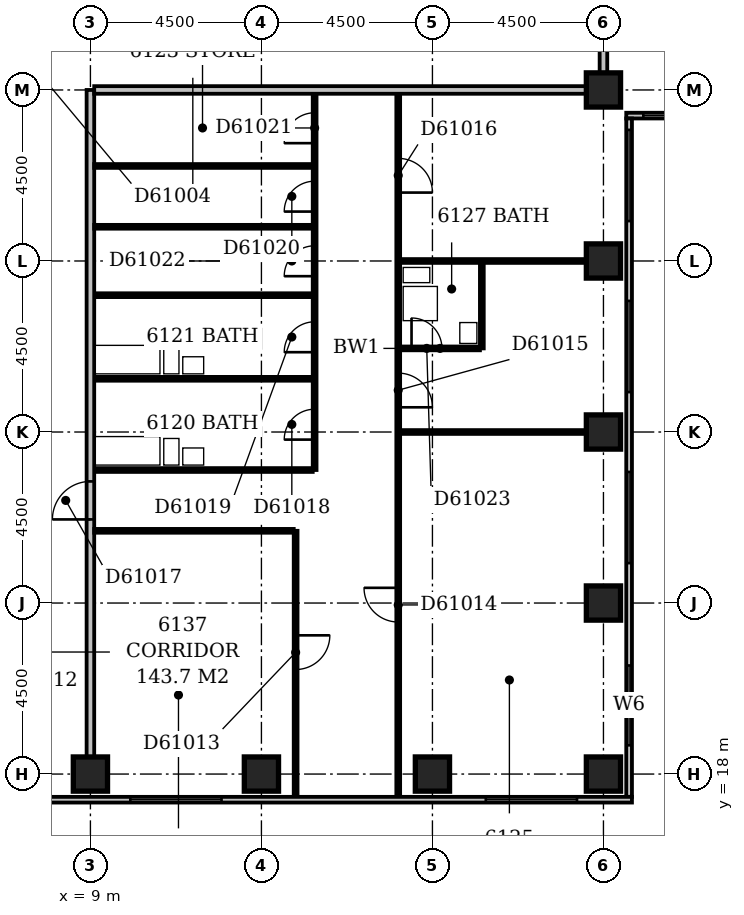
"""IFC4 building model, lengths in metres.
Left out: names, types, materials, properties, quantities, classifications, styles, units other than length and angle.
Written with IfcOpenShell. Run it as: python <this file> out.ifc"""

import sys

from ifc_helpers import new_model, si_unit, direction, frame, frame_2d, origin, origin_2d, place, context, subcontext, project, spatial, rectangle, extrude, element, fill, save


model = new_model("IFC4")
c1 = context("Model", 3, precision=1e-05, world=origin(), true_north=direction((0.0, 1.0)))
c2 = subcontext(c1, "Body", "Model", "MODEL_VIEW")
j1 = project(units=[si_unit("LENGTHUNIT", "METRE"), si_unit("PLANEANGLEUNIT", "RADIAN")], contexts=[c1])
p1 = place(None, origin())
s1 = spatial("IfcSite", under=j1, at=p1, CompositionType="ELEMENT")
p2 = place(p1, origin())
s2 = spatial("IfcBuilding", under=s1, at=p2, CompositionType="ELEMENT")
p3 = place(p2, frame((0.0, 0.0, 236.6)))
s3 = spatial("IfcBuildingStorey", under=s2, at=p3, CompositionType="ELEMENT", Elevation=236.6)
for number, where, z_axis, x_axis in (
    (1, (9.0, 18.0, -0.3), (0.0, 0.0, 1.0), (1.0, 0.0, 0.0)),
    (2, (13.5, 18.0, -0.3), (0.0, 0.0, 1.0), (1.0, 0.0, 0.0)),
    (3, (18.0, 18.0, -0.3), (0.0, 0.0, 1.0), (1.0, 0.0, 0.0)),
    (4, (22.5, 18.0, -0.3), (0.0, 0.0, 1.0), (1.0, 0.0, 0.0)),
    (5, (22.5, 22.5, -0.3), (0.0, 0.0, 1.0), (1.0, 0.0, 0.0)),
    (6, (22.5, 27.0, -0.3), (0.0, 0.0, 1.0), (1.0, 0.0, 0.0)),
    (7, (22.5, 31.5, -0.3), (0.0, 0.0, 1.0), (1.0, 0.0, 0.0)),
    (8, (22.5, 36.0, -0.3), (0.0, 0.0, 1.0), (1.0, 0.0, 0.0)),
):
    element("IfcColumn", number, at=place(p3, frame(where, z_axis=z_axis, x_axis=x_axis)), inside=s3, PredefinedType="COLUMN", context=c2, shape_type="SweptSolid", body=[
        extrude(rectangle(XDim=0.9, YDim=0.9, at=origin_2d()), origin(), (0.0, 0.0, 1.0), 3.6),
    ])
p4 = place(p3, frame((3.9, 17.325, 0.0), z_axis=(0.0, 0.0, 1.0), x_axis=(1.0, 0.0, 0.0)))
e9 = element("IfcWall", 9, at=p4, inside=s3, PredefinedType="STANDARD", context=c2, shape_type="SweptSolid", body=[
    extrude(rectangle(XDim=19.35, YDim=0.15, at=frame_2d((9.675, 0.0))), origin(), (0.0, 0.0, 1.0), 2.7),
])
p5 = place(p4, frame((6.15, 0.0, 0.6)))
e10 = element("IfcOpeningElement", 10, at=p5, cuts=e9, PredefinedType="OPENING", context=c2, shape_type="SweptSolid", body=[
    extrude(rectangle(XDim=2.4, YDim=1.8, at=frame_2d((1.2, 0.9))), frame((0.0, 0.087, 0.0), z_axis=(0.0, -1.0, 0.0), x_axis=(1.0, 0.0, 0.0)), (0.0, 0.0, 1.0), 0.174),
])
p6 = place(p4, frame((15.504, 0.0, 0.6)))
e11 = element("IfcOpeningElement", 11, at=p6, cuts=e9, PredefinedType="OPENING", context=c2, shape_type="SweptSolid", body=[
    extrude(rectangle(XDim=2.4, YDim=1.8, at=frame_2d((1.2, 0.9))), frame((0.0, 0.087, 0.0), z_axis=(0.0, -1.0, 0.0), x_axis=(1.0, 0.0, 0.0)), (0.0, 0.0, 1.0), 0.174),
])
p7 = place(p3, frame((23.175, 17.4, 0.0), z_axis=(0.0, 0.0, 1.0), x_axis=(0.0, 1.0, 0.0)))
e12 = element("IfcWall", 12, at=p7, inside=s3, PredefinedType="STANDARD", context=c2, shape_type="SweptSolid", body=[
    extrude(rectangle(XDim=17.85, YDim=0.15, at=frame_2d((8.925, 0.0))), origin(), (0.0, 0.0, 1.0), 2.7),
])
p8 = place(p7, frame((1.357, 0.0, 0.6)))
e13 = element("IfcOpeningElement", 13, at=p8, cuts=e12, PredefinedType="OPENING", context=c2, shape_type="SweptSolid", body=[
    extrude(rectangle(XDim=2.1, YDim=1.8, at=frame_2d((1.05, 0.9))), frame((0.0, 0.087, 0.0), z_axis=(0.0, -1.0, 0.0), x_axis=(1.0, 0.0, 0.0)), (0.0, 0.0, 1.0), 0.174),
])
p9 = place(p7, frame((6.15, 0.0, 0.6)))
e14 = element("IfcOpeningElement", 14, at=p9, cuts=e12, PredefinedType="OPENING", context=c2, shape_type="SweptSolid", body=[
    extrude(rectangle(XDim=2.4, YDim=1.8, at=frame_2d((1.2, 0.9))), frame((0.0, 0.087, 0.0), z_axis=(0.0, -1.0, 0.0), x_axis=(1.0, 0.0, 0.0)), (0.0, 0.0, 1.0), 0.174),
])
p10 = place(p7, frame((10.65, 0.0, 0.6)))
e15 = element("IfcOpeningElement", 15, at=p10, cuts=e12, PredefinedType="OPENING", context=c2, shape_type="SweptSolid", body=[
    extrude(rectangle(XDim=2.4, YDim=1.8, at=frame_2d((1.2, 0.9))), frame((0.0, 0.087, 0.0), z_axis=(0.0, -1.0, 0.0), x_axis=(1.0, 0.0, 0.0)), (0.0, 0.0, 1.0), 0.174),
])
p11 = place(p7, frame((15.15, 0.0, 0.6)))
e16 = element("IfcOpeningElement", 16, at=p11, cuts=e12, PredefinedType="OPENING", context=c2, shape_type="SweptSolid", body=[
    extrude(rectangle(XDim=2.4, YDim=1.8, at=frame_2d((1.2, 0.9))), frame((0.0, 0.087, 0.0), z_axis=(0.0, -1.0, 0.0), x_axis=(1.0, 0.0, 0.0)), (0.0, 0.0, 1.0), 0.174),
])
p12 = place(p3, frame((23.1, 35.325, 0.0), z_axis=(0.0, 0.0, 1.0), x_axis=(1.0, 0.0, 0.0)))
e17 = element("IfcWall", 17, at=p12, inside=s3, PredefinedType="STANDARD", context=c2, shape_type="SweptSolid", body=[
    extrude(rectangle(XDim=18.15, YDim=0.15, at=frame_2d((9.075, 0.0))), origin(), (0.0, 0.0, 1.0), 2.7),
])
p13 = place(p12, frame((0.45, 0.0, 0.6)))
e18 = element("IfcOpeningElement", 18, at=p13, cuts=e17, PredefinedType="OPENING", context=c2, shape_type="SweptSolid", body=[
    extrude(rectangle(XDim=2.4, YDim=1.8, at=frame_2d((1.2, 0.9))), frame((0.0, 0.087, 0.0), z_axis=(0.0, -1.0, 0.0), x_axis=(1.0, 0.0, 0.0)), (0.0, 0.0, 1.0), 0.174),
])
p14 = place(p12, frame((5.242, 0.0, 0.6)))
e19 = element("IfcOpeningElement", 19, at=p14, cuts=e17, PredefinedType="OPENING", context=c2, shape_type="SweptSolid", body=[
    extrude(rectangle(XDim=2.4, YDim=1.8, at=frame_2d((1.2, 0.9))), frame((0.0, 0.087, 0.0), z_axis=(0.0, -1.0, 0.0), x_axis=(1.0, 0.0, 0.0)), (0.0, 0.0, 1.0), 0.174),
])
p15 = place(p12, frame((9.45, 0.0, 0.6)))
e20 = element("IfcOpeningElement", 20, at=p15, cuts=e17, PredefinedType="OPENING", context=c2, shape_type="SweptSolid", body=[
    extrude(rectangle(XDim=2.4, YDim=1.8, at=frame_2d((1.2, 0.9))), frame((0.0, 0.087, 0.0), z_axis=(0.0, -1.0, 0.0), x_axis=(1.0, 0.0, 0.0)), (0.0, 0.0, 1.0), 0.174),
])
p16 = place(p12, frame((13.95, 0.0, 0.6)))
e21 = element("IfcOpeningElement", 21, at=p16, cuts=e17, PredefinedType="OPENING", context=c2, shape_type="SweptSolid", body=[
    extrude(rectangle(XDim=2.4, YDim=1.8, at=frame_2d((1.2, 0.9))), frame((0.0, 0.087, 0.0), z_axis=(0.0, -1.0, 0.0), x_axis=(1.0, 0.0, 0.0)), (0.0, 0.0, 1.0), 0.174),
])
p17 = place(p3, frame((14.4, 17.4, 0.0), z_axis=(0.0, 0.0, 1.0), x_axis=(0.0, 1.0, 0.0)))
e22 = element("IfcWall", 22, at=p17, inside=s3, PredefinedType="PARTITIONING", context=c2, shape_type="SweptSolid", body=[
    extrude(rectangle(XDim=7.0, YDim=0.1, at=frame_2d((3.5, 0.0))), origin(), (0.0, 0.0, 1.0), 3.3),
])
p18 = place(p17, frame((3.35, 0.0, 0.0)))
e23 = element("IfcOpeningElement", 23, at=p18, cuts=e22, PredefinedType="OPENING", context=c2, shape_type="SweptSolid", body=[
    extrude(rectangle(XDim=0.9, YDim=2.1, at=frame_2d((0.45, 1.05))), frame((0.0, 0.062, 0.0), z_axis=(0.0, -1.0, 0.0), x_axis=(1.0, 0.0, 0.0)), (0.0, 0.0, 1.0), 0.124),
])
p19 = place(p3, frame((17.1, 17.4, 0.0), z_axis=(0.0, 0.0, 1.0), x_axis=(0.0, 1.0, 0.0)))
e24 = element("IfcWall", 24, at=p19, inside=s3, PredefinedType="PARTITIONING", context=c2, shape_type="SweptSolid", body=[
    extrude(rectangle(XDim=18.5, YDim=0.1, at=frame_2d((9.25, 0.0))), origin(), (0.0, 0.0, 1.0), 3.3),
])
p20 = place(p19, frame((4.6, 0.0, 0.0)))
e25 = element("IfcOpeningElement", 25, at=p20, cuts=e24, PredefinedType="OPENING", context=c2, shape_type="SweptSolid", body=[
    extrude(rectangle(XDim=0.9, YDim=2.1, at=frame_2d((0.45, 1.05))), frame((0.0, 0.062, 0.0), z_axis=(0.0, -1.0, 0.0), x_axis=(1.0, 0.0, 0.0)), (0.0, 0.0, 1.0), 0.124),
])
p21 = place(p19, frame((10.25, 0.0, 0.0)))
e26 = element("IfcOpeningElement", 26, at=p21, cuts=e24, PredefinedType="OPENING", context=c2, shape_type="SweptSolid", body=[
    extrude(rectangle(XDim=0.9, YDim=2.1, at=frame_2d((0.45, 1.05))), frame((0.0, 0.062, 0.0), z_axis=(0.0, -1.0, 0.0), x_axis=(1.0, 0.0, 0.0)), (0.0, 0.0, 1.0), 0.124),
])
p22 = place(p19, frame((15.9, 0.0, 0.0)))
e27 = element("IfcOpeningElement", 27, at=p22, cuts=e24, PredefinedType="OPENING", context=c2, shape_type="SweptSolid", body=[
    extrude(rectangle(XDim=0.9, YDim=2.1, at=frame_2d((0.45, 1.05))), frame((0.0, 0.062, 0.0), z_axis=(0.0, -1.0, 0.0), x_axis=(1.0, 0.0, 0.0)), (0.0, 0.0, 1.0), 0.124),
])
p23 = place(p3, frame((9.0, 18.45, 0.0), z_axis=(0.0, 0.0, 1.0), x_axis=(0.0, 1.0, 0.0)))
e28 = element("IfcWall", 28, at=p23, inside=s3, PredefinedType="PARTITIONING", context=c2, shape_type="SweptSolid", body=[
    extrude(rectangle(XDim=17.55, YDim=0.2, at=frame_2d((8.775, 0.0))), origin(), (0.0, 0.0, 1.0), 3.3),
])
p24 = place(p23, frame((6.25, 0.0, 0.0)))
e29 = element("IfcOpeningElement", 29, at=p24, cuts=e28, PredefinedType="OPENING", context=c2, shape_type="SweptSolid", body=[
    extrude(rectangle(XDim=1.0, YDim=2.1, at=frame_2d((0.5, 1.05))), frame((0.0, 0.112, 0.0), z_axis=(0.0, -1.0, 0.0), x_axis=(1.0, 0.0, 0.0)), (0.0, 0.0, 1.0), 0.224),
])
p25 = place(p3, frame((9.1, 24.4, 0.0), z_axis=(0.0, 0.0, 1.0), x_axis=(1.0, 0.0, 0.0)))
e30 = element("IfcWall", 30, at=p25, inside=s3, PredefinedType="PARTITIONING", context=c2, shape_type="SweptSolid", body=[
    extrude(rectangle(XDim=5.25, YDim=0.1, at=frame_2d((2.625, 0.0))), origin(), (0.0, 0.0, 1.0), 3.3),
])
p26 = place(p3, frame((9.1, 26.0, 0.0), z_axis=(0.0, 0.0, 1.0), x_axis=(1.0, 0.0, 0.0)))
e31 = element("IfcWall", 31, at=p26, inside=s3, PredefinedType="PLUMBINGWALL", context=c2, shape_type="SweptSolid", body=[
    extrude(rectangle(XDim=5.75, YDim=0.1, at=frame_2d((2.875, 0.0))), origin(), (0.0, 0.0, 1.0), 3.3),
])
p27 = place(p3, frame((14.9, 26.0, 0.0), z_axis=(0.0, 0.0, 1.0), x_axis=(0.0, 1.0, 0.0)))
e32 = element("IfcWall", 32, at=p27, inside=s3, PredefinedType="PARTITIONING", context=c2, shape_type="SweptSolid", body=[
    extrude(rectangle(XDim=9.9, YDim=0.1, at=frame_2d((4.95, 0.0))), origin(), (0.0, 0.0, 1.0), 3.3),
])
p28 = place(p27, frame((0.8, 0.0, 0.0)))
e33 = element("IfcOpeningElement", 33, at=p28, cuts=e32, PredefinedType="OPENING", context=c2, shape_type="SweptSolid", body=[
    extrude(rectangle(XDim=0.8, YDim=2.1, at=frame_2d((0.4, 1.05))), frame((0.0, 0.062, 0.0), z_axis=(0.0, -1.0, 0.0), x_axis=(1.0, 0.0, 0.0)), (0.0, 0.0, 1.0), 0.124),
])
p29 = place(p27, frame((3.1, 0.0, 0.0)))
e34 = element("IfcOpeningElement", 34, at=p29, cuts=e32, PredefinedType="OPENING", context=c2, shape_type="SweptSolid", body=[
    extrude(rectangle(XDim=0.8, YDim=2.1, at=frame_2d((0.4, 1.05))), frame((0.0, 0.062, 0.0), z_axis=(0.0, -1.0, 0.0), x_axis=(1.0, 0.0, 0.0)), (0.0, 0.0, 1.0), 0.124),
])
p30 = place(p27, frame((6.8, 0.0, 0.0)))
e35 = element("IfcOpeningElement", 35, at=p30, cuts=e32, PredefinedType="OPENING", context=c2, shape_type="SweptSolid", body=[
    extrude(rectangle(XDim=0.8, YDim=2.1, at=frame_2d((0.4, 1.05))), frame((0.0, 0.062, 0.0), z_axis=(0.0, -1.0, 0.0), x_axis=(1.0, 0.0, 0.0)), (0.0, 0.0, 1.0), 0.124),
])
p31 = place(p27, frame((8.6, 0.0, 0.0)))
e36 = element("IfcOpeningElement", 36, at=p31, cuts=e32, PredefinedType="OPENING", context=c2, shape_type="SweptSolid", body=[
    extrude(rectangle(XDim=0.8, YDim=2.1, at=frame_2d((0.4, 1.05))), frame((0.0, 0.062, 0.0), z_axis=(0.0, -1.0, 0.0), x_axis=(1.0, 0.0, 0.0)), (0.0, 0.0, 1.0), 0.124),
])
p32 = place(p27, frame((5.1, 0.0, 0.0)))
e37 = element("IfcOpeningElement", 37, at=p32, cuts=e32, PredefinedType="OPENING", context=c2, shape_type="SweptSolid", body=[
    extrude(rectangle(XDim=0.8, YDim=2.1, at=frame_2d((0.4, 1.05))), frame((0.0, 0.062, 0.0), z_axis=(0.0, -1.0, 0.0), x_axis=(1.0, 0.0, 0.0)), (0.0, 0.0, 1.0), 0.124),
])
p33 = place(p3, frame((17.15, 27.0, 0.0), z_axis=(0.0, 0.0, 1.0), x_axis=(1.0, 0.0, 0.0)))
e38 = element("IfcWall", 38, at=p33, inside=s3, PredefinedType="PARTITIONING", context=c2, shape_type="SweptSolid", body=[
    extrude(rectangle(XDim=4.9, YDim=0.1, at=frame_2d((2.45, 0.0))), origin(), (0.0, 0.0, 1.0), 2.7),
])
p34 = place(p3, frame((9.1, 28.4, 0.0), z_axis=(0.0, 0.0, 1.0), x_axis=(1.0, 0.0, 0.0)))
e39 = element("IfcWall", 39, at=p34, inside=s3, PredefinedType="PLUMBINGWALL", context=c2, shape_type="SweptSolid", body=[
    extrude(rectangle(XDim=5.75, YDim=0.1, at=frame_2d((2.875, 0.0))), origin(), (0.0, 0.0, 1.0), 3.3),
])
p35 = place(p3, frame((17.15, 29.2, 0.0), z_axis=(0.0, 0.0, 1.0), x_axis=(1.0, 0.0, 0.0)))
e40 = element("IfcWall", 40, at=p35, inside=s3, PredefinedType="PLUMBINGWALL", context=c2, shape_type="SweptSolid", body=[
    extrude(rectangle(XDim=2.1, YDim=0.1, at=frame_2d((1.05, 0.0))), origin(), (0.0, 0.0, 1.0), 3.3),
])
p36 = place(p35, frame((0.3, 0.0, 0.0)))
e41 = element("IfcOpeningElement", 41, at=p36, cuts=e40, PredefinedType="OPENING", context=c2, shape_type="SweptSolid", body=[
    extrude(rectangle(XDim=0.8, YDim=2.1, at=frame_2d((0.4, 1.05))), frame((0.0, 0.062, 0.0), z_axis=(0.0, -1.0, 0.0), x_axis=(1.0, 0.0, 0.0)), (0.0, 0.0, 1.0), 0.124),
])
p37 = place(p3, frame((19.3, 29.2, 0.0), z_axis=(0.0, 0.0, 1.0), x_axis=(0.0, 1.0, 0.0)))
e42 = element("IfcWall", 42, at=p37, inside=s3, PredefinedType="PLUMBINGWALL", context=c2, shape_type="SweptSolid", body=[
    extrude(rectangle(XDim=2.25, YDim=0.1, at=frame_2d((1.125, 0.0))), origin(), (0.0, 0.0, 1.0), 3.3),
])
p38 = place(p3, frame((9.1, 30.6, 0.0), z_axis=(0.0, 0.0, 1.0), x_axis=(1.0, 0.0, 0.0)))
e43 = element("IfcWall", 43, at=p38, inside=s3, PredefinedType="PLUMBINGWALL", context=c2, shape_type="SweptSolid", body=[
    extrude(rectangle(XDim=5.75, YDim=0.1, at=frame_2d((2.875, 0.0))), origin(), (0.0, 0.0, 1.0), 3.3),
])
p39 = place(p3, frame((17.15, 31.5, 0.0), z_axis=(0.0, 0.0, 1.0), x_axis=(1.0, 0.0, 0.0)))
e44 = element("IfcWall", 44, at=p39, inside=s3, PredefinedType="PARTITIONING", context=c2, shape_type="SweptSolid", body=[
    extrude(rectangle(XDim=4.9, YDim=0.1, at=frame_2d((2.45, 0.0))), origin(), (0.0, 0.0, 1.0), 3.3),
])
for number, where, z_axis, x_axis in (
    (45, (9.1, 32.4, 0.0), (0.0, 0.0, 1.0), (1.0, 0.0, 0.0)),
    (46, (9.1, 34.0, 0.0), (0.0, 0.0, 1.0), (1.0, 0.0, 0.0)),
):
    element("IfcWall", number, at=place(p3, frame(where, z_axis=z_axis, x_axis=x_axis)), inside=s3, PredefinedType="PARTITIONING", context=c2, shape_type="SweptSolid", body=[
        extrude(rectangle(XDim=5.75, YDim=0.1, at=frame_2d((2.875, 0.0))), origin(), (0.0, 0.0, 1.0), 3.3),
    ])
p40 = place(p3, frame((9.1, 36.0, 0.0), z_axis=(0.0, 0.0, 1.0), x_axis=(1.0, 0.0, 0.0)))
e47 = element("IfcWall", 47, at=p40, inside=s3, PredefinedType="PARTITIONING", context=c2, shape_type="SweptSolid", body=[
    extrude(rectangle(XDim=12.95, YDim=0.2, at=frame_2d((6.475, 0.0))), origin(), (0.0, 0.0, 1.0), 3.3),
])
p41 = place(p3, frame((22.5, 36.45, 0.0), z_axis=(0.0, 0.0, 1.0), x_axis=(0.0, 1.0, 0.0)))
e48 = element("IfcWall", 48, at=p41, inside=s3, PredefinedType="PARTITIONING", context=c2, shape_type="SweptSolid", body=[
    extrude(rectangle(XDim=13.05, YDim=0.2, at=frame_2d((6.525, 0.0))), origin(), (0.0, 0.0, 1.0), 3.3),
])
p42 = place(p5, origin())
e49 = element("IfcWindow", 49, at=p42, inside=s3, PartitioningType="SINGLE_PANEL", PredefinedType="WINDOW", context=c2, shape_type="SweptSolid", body=[
    extrude(rectangle(XDim=2.4, YDim=1.8, at=frame_2d((1.2, 0.9))), frame((0.0, 0.03, 0.0), z_axis=(0.0, -1.0, 0.0), x_axis=(1.0, 0.0, 0.0)), (0.0, 0.0, 1.0), 0.06),
])
fill(e10, e49)
p43 = place(p6, origin())
e50 = element("IfcWindow", 50, at=p43, inside=s3, PartitioningType="SINGLE_PANEL", PredefinedType="WINDOW", context=c2, shape_type="SweptSolid", body=[
    extrude(rectangle(XDim=2.4, YDim=1.8, at=frame_2d((1.2, 0.9))), frame((0.0, 0.03, 0.0), z_axis=(0.0, -1.0, 0.0), x_axis=(1.0, 0.0, 0.0)), (0.0, 0.0, 1.0), 0.06),
])
fill(e11, e50)
p44 = place(p8, origin())
e51 = element("IfcWindow", 51, at=p44, inside=s3, PartitioningType="SINGLE_PANEL", PredefinedType="WINDOW", context=c2, shape_type="SweptSolid", body=[
    extrude(rectangle(XDim=2.1, YDim=1.8, at=frame_2d((1.05, 0.9))), frame((0.0, 0.03, 0.0), z_axis=(0.0, -1.0, 0.0), x_axis=(1.0, 0.0, 0.0)), (0.0, 0.0, 1.0), 0.06),
])
fill(e13, e51)
p45 = place(p9, origin())
e52 = element("IfcWindow", 52, at=p45, inside=s3, PartitioningType="SINGLE_PANEL", PredefinedType="WINDOW", context=c2, shape_type="SweptSolid", body=[
    extrude(rectangle(XDim=2.4, YDim=1.8, at=frame_2d((1.2, 0.9))), frame((0.0, 0.03, 0.0), z_axis=(0.0, -1.0, 0.0), x_axis=(1.0, 0.0, 0.0)), (0.0, 0.0, 1.0), 0.06),
])
fill(e14, e52)
p46 = place(p10, origin())
e53 = element("IfcWindow", 53, at=p46, inside=s3, PartitioningType="SINGLE_PANEL", PredefinedType="WINDOW", context=c2, shape_type="SweptSolid", body=[
    extrude(rectangle(XDim=2.4, YDim=1.8, at=frame_2d((1.2, 0.9))), frame((0.0, 0.03, 0.0), z_axis=(0.0, -1.0, 0.0), x_axis=(1.0, 0.0, 0.0)), (0.0, 0.0, 1.0), 0.06),
])
fill(e15, e53)
p47 = place(p11, origin())
e54 = element("IfcWindow", 54, at=p47, inside=s3, PartitioningType="SINGLE_PANEL", PredefinedType="WINDOW", context=c2, shape_type="SweptSolid", body=[
    extrude(rectangle(XDim=2.4, YDim=1.8, at=frame_2d((1.2, 0.9))), frame((0.0, 0.03, 0.0), z_axis=(0.0, -1.0, 0.0), x_axis=(1.0, 0.0, 0.0)), (0.0, 0.0, 1.0), 0.06),
])
fill(e16, e54)
p48 = place(p13, origin())
e55 = element("IfcWindow", 55, at=p48, inside=s3, PartitioningType="SINGLE_PANEL", PredefinedType="WINDOW", context=c2, shape_type="SweptSolid", body=[
    extrude(rectangle(XDim=2.4, YDim=1.8, at=frame_2d((1.2, 0.9))), frame((0.0, 0.03, 0.0), z_axis=(0.0, -1.0, 0.0), x_axis=(1.0, 0.0, 0.0)), (0.0, 0.0, 1.0), 0.06),
])
fill(e18, e55)
p49 = place(p18, origin())
e56 = element("IfcDoor", 56, at=p49, inside=s3, OperationType="SINGLE_SWING_RIGHT", PredefinedType="DOOR", context=c2, shape_type="SweptSolid", body=[
    extrude(rectangle(XDim=0.9, YDim=2.1, at=frame_2d((0.45, 1.05))), frame((0.0, 0.025, 0.0), z_axis=(0.0, -1.0, 0.0), x_axis=(1.0, 0.0, 0.0)), (0.0, 0.0, 1.0), 0.05),
])
fill(e23, e56)
p50 = place(p20, frame((0.9, 0.0, 0.0), z_axis=(0.0, 0.0, 1.0), x_axis=(-1.0, 0.0, 0.0)))
e57 = element("IfcDoor", 57, at=p50, inside=s3, OperationType="SINGLE_SWING_LEFT", PredefinedType="DOOR", context=c2, shape_type="SweptSolid", body=[
    extrude(rectangle(XDim=0.9, YDim=2.1, at=frame_2d((0.45, 1.05))), frame((0.0, 0.025, 0.0), z_axis=(0.0, -1.0, 0.0), x_axis=(1.0, 0.0, 0.0)), (0.0, 0.0, 1.0), 0.05),
])
fill(e25, e57)
p51 = place(p21, frame((0.9, 0.0, 0.0), z_axis=(0.0, 0.0, 1.0), x_axis=(-1.0, 0.0, 0.0)))
e58 = element("IfcDoor", 58, at=p51, inside=s3, OperationType="SINGLE_SWING_RIGHT", PredefinedType="DOOR", context=c2, shape_type="SweptSolid", body=[
    extrude(rectangle(XDim=0.9, YDim=2.1, at=frame_2d((0.45, 1.05))), frame((0.0, 0.025, 0.0), z_axis=(0.0, -1.0, 0.0), x_axis=(1.0, 0.0, 0.0)), (0.0, 0.0, 1.0), 0.05),
])
fill(e26, e58)
p52 = place(p22, frame((0.9, 0.0, 0.0), z_axis=(0.0, 0.0, 1.0), x_axis=(-1.0, 0.0, 0.0)))
e59 = element("IfcDoor", 59, at=p52, inside=s3, OperationType="SINGLE_SWING_RIGHT", PredefinedType="DOOR", context=c2, shape_type="SweptSolid", body=[
    extrude(rectangle(XDim=0.9, YDim=2.1, at=frame_2d((0.45, 1.05))), frame((0.0, 0.025, 0.0), z_axis=(0.0, -1.0, 0.0), x_axis=(1.0, 0.0, 0.0)), (0.0, 0.0, 1.0), 0.05),
])
fill(e27, e59)
p53 = place(p24, origin())
e60 = element("IfcDoor", 60, at=p53, inside=s3, OperationType="SINGLE_SWING_LEFT", PredefinedType="DOOR", context=c2, shape_type="SweptSolid", body=[
    extrude(rectangle(XDim=1.0, YDim=2.1, at=frame_2d((0.5, 1.05))), frame((0.0, 0.025, 0.0), z_axis=(0.0, -1.0, 0.0), x_axis=(1.0, 0.0, 0.0)), (0.0, 0.0, 1.0), 0.05),
])
fill(e29, e60)
p54 = place(p28, origin())
e61 = element("IfcDoor", 61, at=p54, inside=s3, OperationType="SINGLE_SWING_LEFT", PredefinedType="DOOR", context=c2, shape_type="SweptSolid", body=[
    extrude(rectangle(XDim=0.8, YDim=2.1, at=frame_2d((0.4, 1.05))), frame((0.0, 0.025, 0.0), z_axis=(0.0, -1.0, 0.0), x_axis=(1.0, 0.0, 0.0)), (0.0, 0.0, 1.0), 0.05),
])
fill(e33, e61)
p55 = place(p29, origin())
e62 = element("IfcDoor", 62, at=p55, inside=s3, OperationType="SINGLE_SWING_LEFT", PredefinedType="DOOR", context=c2, shape_type="SweptSolid", body=[
    extrude(rectangle(XDim=0.8, YDim=2.1, at=frame_2d((0.4, 1.05))), frame((0.0, 0.025, 0.0), z_axis=(0.0, -1.0, 0.0), x_axis=(1.0, 0.0, 0.0)), (0.0, 0.0, 1.0), 0.05),
])
fill(e34, e62)
p56 = place(p30, origin())
e63 = element("IfcDoor", 63, at=p56, inside=s3, OperationType="SINGLE_SWING_LEFT", PredefinedType="DOOR", context=c2, shape_type="SweptSolid", body=[
    extrude(rectangle(XDim=0.8, YDim=2.1, at=frame_2d((0.4, 1.05))), frame((0.0, 0.025, 0.0), z_axis=(0.0, -1.0, 0.0), x_axis=(1.0, 0.0, 0.0)), (0.0, 0.0, 1.0), 0.05),
])
fill(e35, e63)
p57 = place(p31, origin())
e64 = element("IfcDoor", 64, at=p57, inside=s3, OperationType="SINGLE_SWING_LEFT", PredefinedType="DOOR", context=c2, shape_type="SweptSolid", body=[
    extrude(rectangle(XDim=0.8, YDim=2.1, at=frame_2d((0.4, 1.05))), frame((0.0, 0.025, 0.0), z_axis=(0.0, -1.0, 0.0), x_axis=(1.0, 0.0, 0.0)), (0.0, 0.0, 1.0), 0.05),
])
fill(e36, e64)
p58 = place(p32, origin())
e65 = element("IfcDoor", 65, at=p58, inside=s3, OperationType="SINGLE_SWING_LEFT", PredefinedType="DOOR", context=c2, shape_type="SweptSolid", body=[
    extrude(rectangle(XDim=0.8, YDim=2.1, at=frame_2d((0.4, 1.05))), frame((0.0, 0.025, 0.0), z_axis=(0.0, -1.0, 0.0), x_axis=(1.0, 0.0, 0.0)), (0.0, 0.0, 1.0), 0.05),
])
fill(e37, e65)
p59 = place(p36, origin())
e66 = element("IfcDoor", 66, at=p59, inside=s3, OperationType="SINGLE_SWING_LEFT", PredefinedType="DOOR", context=c2, shape_type="SweptSolid", body=[
    extrude(rectangle(XDim=0.8, YDim=2.1, at=frame_2d((0.4, 1.05))), frame((0.0, 0.025, 0.0), z_axis=(0.0, -1.0, 0.0), x_axis=(1.0, 0.0, 0.0)), (0.0, 0.0, 1.0), 0.05),
])
fill(e41, e66)
save(model, sys.argv[1])
